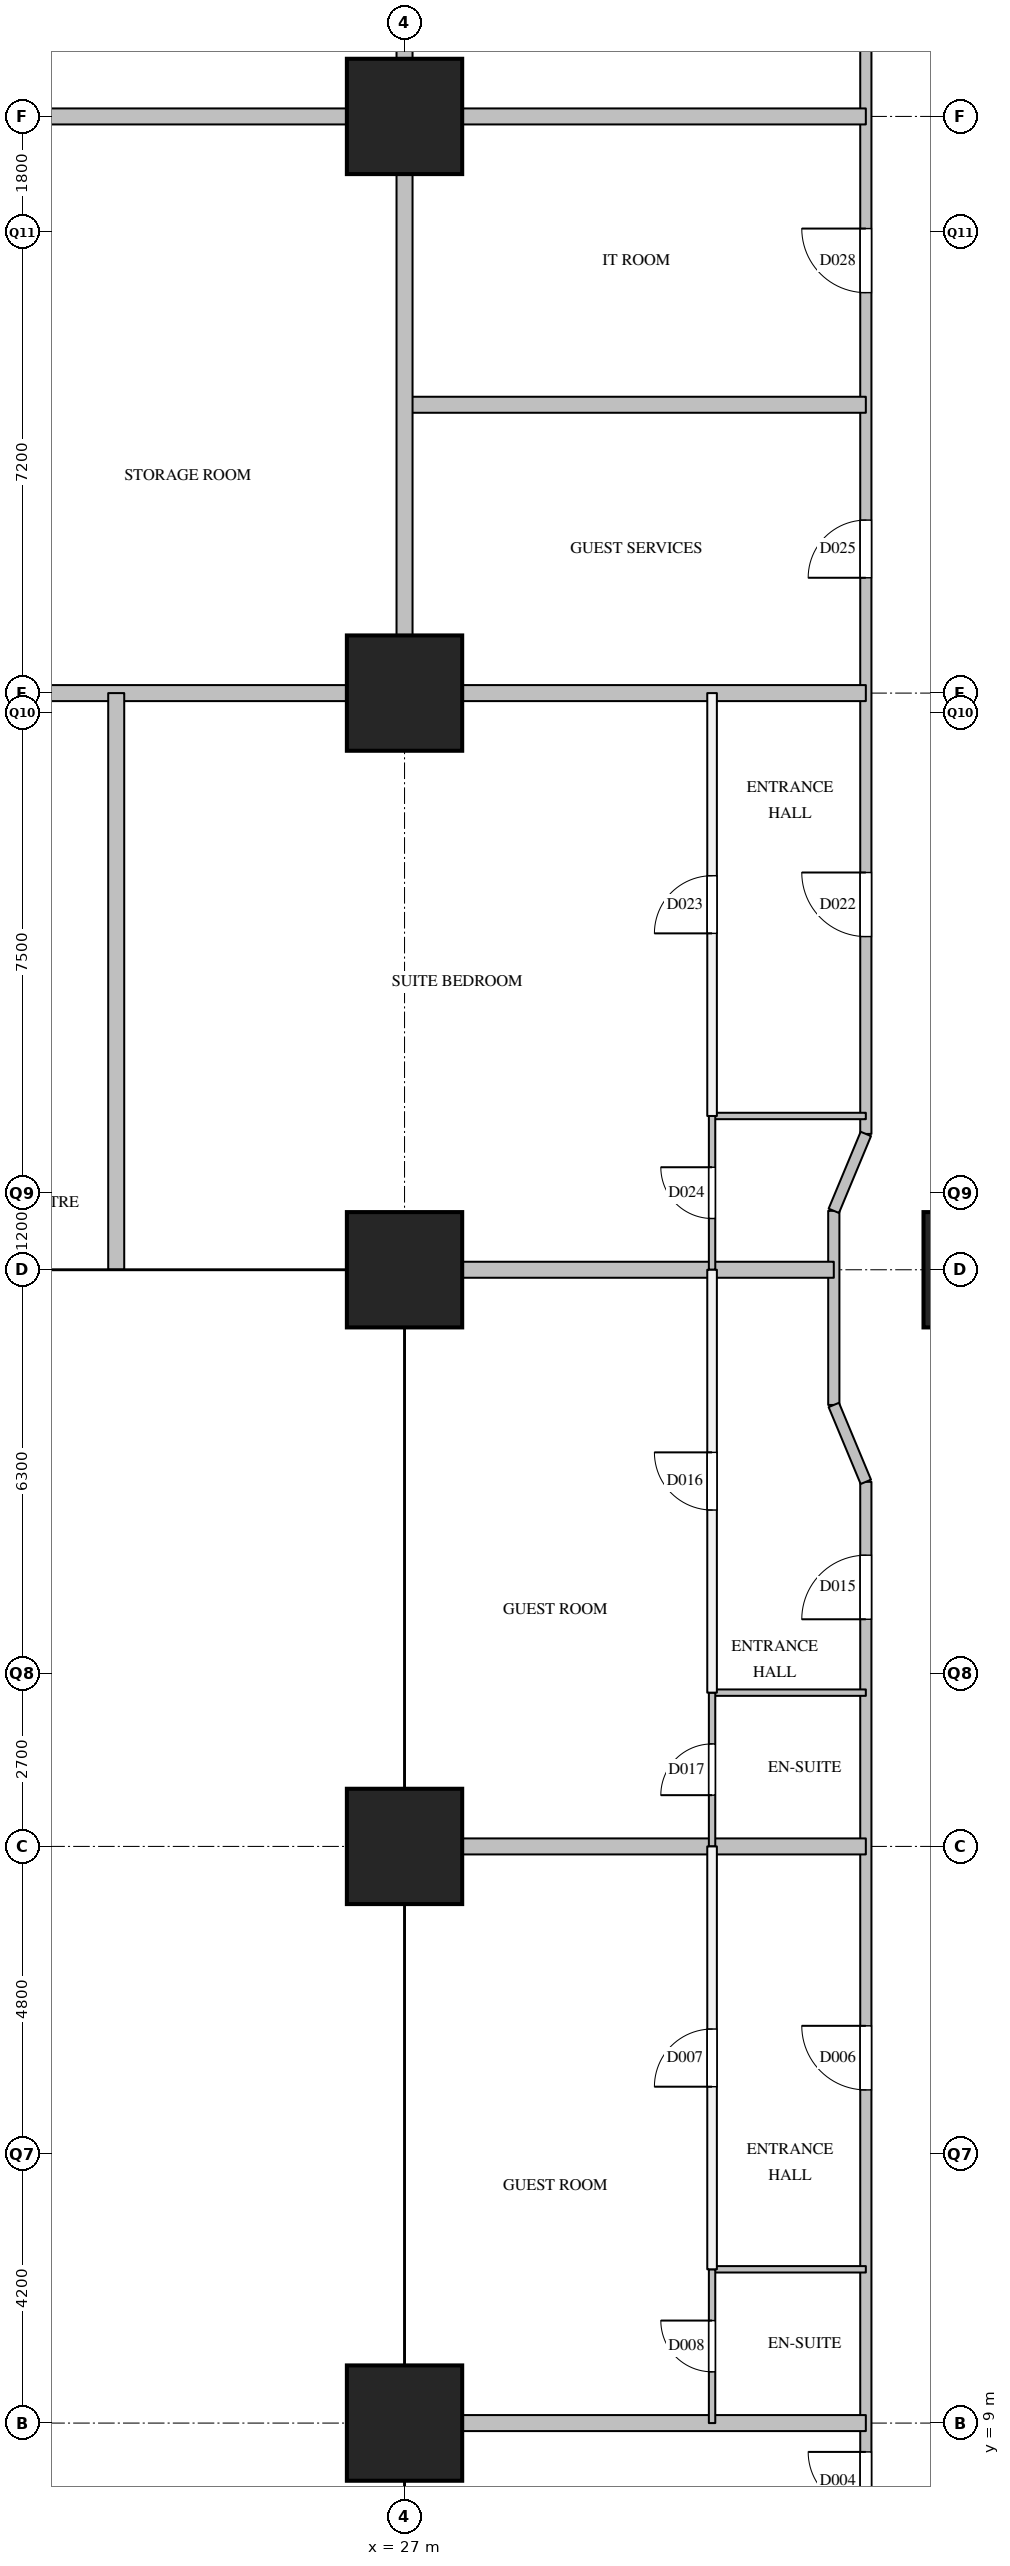
"""IFC4 building model, lengths in metres.
Left out: names, types, materials, properties, quantities, classifications, styles, units other than length and angle.
Written with IfcOpenShell. Run it as: python <this file> out.ifc"""

import sys

from ifc_helpers import new_model, si_unit, direction, frame, frame_2d, origin, origin_2d, place, context, subcontext, project, spatial, rectangle, extrude, element, fill, save


model = new_model("IFC4")
c1 = context("Model", 3, precision=1e-05, world=origin(), true_north=direction((0.0, 1.0)))
c2 = subcontext(c1, "Body", "Model", "MODEL_VIEW")
j1 = project(units=[si_unit("LENGTHUNIT", "METRE"), si_unit("PLANEANGLEUNIT", "RADIAN")], contexts=[c1])
p1 = place(None, origin())
s1 = spatial("IfcSite", under=j1, at=p1, CompositionType="ELEMENT")
p2 = place(p1, origin())
s2 = spatial("IfcBuilding", under=s1, at=p2, CompositionType="ELEMENT")
p3 = place(p2, frame((0.0, 0.0, 100.6)))
s3 = spatial("IfcBuildingStorey", under=s2, at=p3, CompositionType="ELEMENT", Elevation=100.6)
for number, where, z_axis, x_axis in (
    (1, (27.0, 9.0, 0.0), (0.0, 0.0, 1.0), (1.0, 0.0, 0.0)),
    (2, (27.0, 18.0, 0.0), (0.0, 0.0, 1.0), (1.0, 0.0, 0.0)),
    (3, (27.0, 27.0, 0.0), (0.0, 0.0, 1.0), (1.0, 0.0, 0.0)),
    (4, (27.0, 36.0, 0.0), (0.0, 0.0, 1.0), (1.0, 0.0, 0.0)),
    (5, (27.0, 45.0, 0.0), (0.0, 0.0, 1.0), (1.0, 0.0, 0.0)),
    (6, (36.0, 27.0, 0.0), (0.0, 0.0, 1.0), (1.0, 0.0, 0.0)),
):
    element("IfcColumn", number, at=place(p3, frame(where, z_axis=z_axis, x_axis=x_axis)), inside=s3, PredefinedType="COLUMN", context=c2, shape_type="SweptSolid", body=[
        extrude(rectangle(XDim=1.8, YDim=1.8, at=origin_2d()), origin(), (0.0, 0.0, 1.0), 3.8),
    ])
p4 = place(p3, frame((33.7, 24.89, 0.0), z_axis=(0.0, 0.0, 1.0), x_axis=(0.0, 1.0, 0.0)))
e7 = element("IfcWall", 7, at=p4, inside=s3, PredefinedType="PARTITIONING", context=c2, shape_type="SweptSolid", body=[
    extrude(rectangle(XDim=3.03, YDim=0.175, at=frame_2d((1.515, 0.0))), origin(), (0.0, 0.0, 1.0), 2.5),
])
p5 = place(p3, frame((34.2, 7.2, 0.0), z_axis=(0.0, 0.0, 1.0), x_axis=(0.0, 1.0, 0.0)))
e8 = element("IfcWall", 8, at=p5, inside=s3, PredefinedType="PARTITIONING", context=c2, shape_type="SweptSolid", body=[
    extrude(rectangle(XDim=16.49, YDim=0.175, at=frame_2d((8.245, 0.0))), origin(), (0.0, 0.0, 1.0), 3.5),
])
p6 = place(p5, frame((0.45, 0.0, 0.0)))
e9 = element("IfcOpeningElement", 9, at=p6, cuts=e8, PredefinedType="OPENING", context=c2, shape_type="SweptSolid", body=[
    extrude(rectangle(XDim=0.9, YDim=2.1, at=frame_2d((0.45, 1.05))), frame((0.0, 0.097, 0.0), z_axis=(0.0, -1.0, 0.0), x_axis=(1.0, 0.0, 0.0)), (0.0, 0.0, 1.0), 0.195),
])
p7 = place(p5, frame((7.0, 0.0, 0.0)))
e10 = element("IfcOpeningElement", 10, at=p7, cuts=e8, PredefinedType="OPENING", context=c2, shape_type="SweptSolid", body=[
    extrude(rectangle(XDim=1.0, YDim=2.1, at=frame_2d((0.5, 1.05))), frame((0.0, 0.097, 0.0), z_axis=(0.0, -1.0, 0.0), x_axis=(1.0, 0.0, 0.0)), (0.0, 0.0, 1.0), 0.195),
])
p8 = place(p5, frame((14.345, 0.0, 0.0)))
e11 = element("IfcOpeningElement", 11, at=p8, cuts=e8, PredefinedType="OPENING", context=c2, shape_type="SweptSolid", body=[
    extrude(rectangle(XDim=1.0, YDim=2.1, at=frame_2d((0.5, 1.05))), frame((0.0, 0.097, 0.0), z_axis=(0.0, -1.0, 0.0), x_axis=(1.0, 0.0, 0.0)), (0.0, 0.0, 1.0), 0.195),
])
p9 = place(p3, frame((34.2, 29.12, 0.0), z_axis=(0.0, 0.0, 1.0), x_axis=(0.0, 1.0, 0.0)))
e12 = element("IfcWall", 12, at=p9, inside=s3, PredefinedType="PARTITIONING", context=c2, shape_type="SweptSolid", body=[
    extrude(rectangle(XDim=22.68, YDim=0.175, at=frame_2d((11.34, 0.0))), origin(), (0.0, 0.0, 1.0), 3.5),
])
p10 = place(p9, frame((3.08, 0.0, 0.0)))
e13 = element("IfcOpeningElement", 13, at=p10, cuts=e12, PredefinedType="OPENING", context=c2, shape_type="SweptSolid", body=[
    extrude(rectangle(XDim=1.0, YDim=2.1, at=frame_2d((0.5, 1.05))), frame((0.0, 0.097, 0.0), z_axis=(0.0, -1.0, 0.0), x_axis=(1.0, 0.0, 0.0)), (0.0, 0.0, 1.0), 0.195),
])
p11 = place(p9, frame((8.68, 0.0, 0.0)))
e14 = element("IfcOpeningElement", 14, at=p11, cuts=e12, PredefinedType="OPENING", context=c2, shape_type="SweptSolid", body=[
    extrude(rectangle(XDim=0.9, YDim=2.1, at=frame_2d((0.45, 1.05))), frame((0.0, 0.097, 0.0), z_axis=(0.0, -1.0, 0.0), x_axis=(1.0, 0.0, 0.0)), (0.0, 0.0, 1.0), 0.195),
])
p12 = place(p9, frame((13.13, 0.0, 0.0)))
e15 = element("IfcOpeningElement", 15, at=p12, cuts=e12, PredefinedType="OPENING", context=c2, shape_type="SweptSolid", body=[
    extrude(rectangle(XDim=1.0, YDim=2.1, at=frame_2d((0.5, 1.05))), frame((0.0, 0.097, 0.0), z_axis=(0.0, -1.0, 0.0), x_axis=(1.0, 0.0, 0.0)), (0.0, 0.0, 1.0), 0.195),
])
p13 = place(p9, frame((18.83, 0.0, 0.0)))
e16 = element("IfcOpeningElement", 16, at=p13, cuts=e12, PredefinedType="OPENING", context=c2, shape_type="SweptSolid", body=[
    extrude(rectangle(XDim=0.9, YDim=2.1, at=frame_2d((0.45, 1.05))), frame((0.0, 0.097, 0.0), z_axis=(0.0, -1.0, 0.0), x_axis=(1.0, 0.0, 0.0)), (0.0, 0.0, 1.0), 0.195),
])
p14 = place(p3, frame((31.8, 11.4, 0.0), z_axis=(0.0, 0.0, 1.0), x_axis=(0.0, 1.0, 0.0)))
e17 = element("IfcWall", 17, at=p14, inside=s3, PredefinedType="PARTITIONING", context=c2, shape_type="SweptSolid", body=[
    extrude(rectangle(XDim=6.6, YDim=0.15, at=frame_2d((3.3, 0.0))), origin(), (0.0, 0.0, 1.0), 3.5),
])
p15 = place(p14, frame((2.85, 0.0, 0.0)))
e18 = element("IfcOpeningElement", 18, at=p15, cuts=e17, PredefinedType="OPENING", context=c2, shape_type="SweptSolid", body=[
    extrude(rectangle(XDim=0.9, YDim=2.1, at=frame_2d((0.45, 1.05))), frame((0.0, 0.085, 0.0), z_axis=(0.0, -1.0, 0.0), x_axis=(1.0, 0.0, 0.0)), (0.0, 0.0, 1.0), 0.17),
])
p16 = place(p3, frame((31.8, 20.4, 0.0), z_axis=(0.0, 0.0, 1.0), x_axis=(0.0, 1.0, 0.0)))
e19 = element("IfcWall", 19, at=p16, inside=s3, PredefinedType="PARTITIONING", context=c2, shape_type="SweptSolid", body=[
    extrude(rectangle(XDim=6.6, YDim=0.15, at=frame_2d((3.3, 0.0))), origin(), (0.0, 0.0, 1.0), 2.5),
])
p17 = place(p16, frame((2.85, 0.0, 0.0)))
e20 = element("IfcOpeningElement", 20, at=p17, cuts=e19, PredefinedType="OPENING", context=c2, shape_type="SweptSolid", body=[
    extrude(rectangle(XDim=0.9, YDim=2.1, at=frame_2d((0.45, 1.05))), frame((0.0, 0.085, 0.0), z_axis=(0.0, -1.0, 0.0), x_axis=(1.0, 0.0, 0.0)), (0.0, 0.0, 1.0), 0.17),
])
p18 = place(p3, frame((31.8, 29.4, 0.0), z_axis=(0.0, 0.0, 1.0), x_axis=(0.0, 1.0, 0.0)))
e21 = element("IfcWall", 21, at=p18, inside=s3, PredefinedType="PARTITIONING", context=c2, shape_type="SweptSolid", body=[
    extrude(rectangle(XDim=6.6, YDim=0.15, at=frame_2d((3.3, 0.0))), origin(), (0.0, 0.0, 1.0), 3.5),
])
p19 = place(p18, frame((2.85, 0.0, 0.0)))
e22 = element("IfcOpeningElement", 22, at=p19, cuts=e21, PredefinedType="OPENING", context=c2, shape_type="SweptSolid", body=[
    extrude(rectangle(XDim=0.9, YDim=2.1, at=frame_2d((0.45, 1.05))), frame((0.0, 0.085, 0.0), z_axis=(0.0, -1.0, 0.0), x_axis=(1.0, 0.0, 0.0)), (0.0, 0.0, 1.0), 0.17),
])
for number, where, z_axis, x_axis in (
    (23, (27.0, 9.0, 0.0), (0.0, 0.0, 1.0), (1.0, 0.0, 0.0)),
    (24, (27.0, 18.0, 0.0), (0.0, 0.0, 1.0), (1.0, 0.0, 0.0)),
):
    element("IfcWall", number, at=place(p3, frame(where, z_axis=z_axis, x_axis=x_axis)), inside=s3, PredefinedType="PARTITIONING", context=c2, shape_type="SweptSolid", body=[
        extrude(rectangle(XDim=7.2, YDim=0.25, at=frame_2d((3.6, 0.0))), origin(), (0.0, 0.0, 1.0), 3.5),
    ])
p20 = place(p3, frame((27.0, 27.0, 0.0), z_axis=(0.0, 0.0, 1.0), x_axis=(1.0, 0.0, 0.0)))
e25 = element("IfcWall", 25, at=p20, inside=s3, PredefinedType="PARTITIONING", context=c2, shape_type="SweptSolid", body=[
    extrude(rectangle(XDim=6.7, YDim=0.25, at=frame_2d((3.35, 0.0))), origin(), (0.0, 0.0, 1.0), 2.5),
])
p21 = place(p3, frame((19.8, 36.0, 0.0), z_axis=(0.0, 0.0, 1.0), x_axis=(1.0, 0.0, 0.0)))
e26 = element("IfcWall", 26, at=p21, inside=s3, PredefinedType="PARTITIONING", context=c2, shape_type="SweptSolid", body=[
    extrude(rectangle(XDim=14.4, YDim=0.25, at=frame_2d((7.2, 0.0))), origin(), (0.0, 0.0, 1.0), 3.5),
])
p22 = place(p3, frame((27.0, 40.5, 0.0), z_axis=(0.0, 0.0, 1.0), x_axis=(1.0, 0.0, 0.0)))
e27 = element("IfcWall", 27, at=p22, inside=s3, PredefinedType="PARTITIONING", context=c2, shape_type="SweptSolid", body=[
    extrude(rectangle(XDim=7.2, YDim=0.25, at=frame_2d((3.6, 0.0))), origin(), (0.0, 0.0, 1.0), 2.5),
])
p23 = place(p3, frame((19.8, 45.0, 0.0), z_axis=(0.0, 0.0, 1.0), x_axis=(1.0, 0.0, 0.0)))
e28 = element("IfcWall", 28, at=p23, inside=s3, PredefinedType="PARTITIONING", context=c2, shape_type="SweptSolid", body=[
    extrude(rectangle(XDim=14.4, YDim=0.25, at=frame_2d((7.2, 0.0))), origin(), (0.0, 0.0, 1.0), 3.5),
])
p24 = place(p3, frame((22.5, 27.0, 0.0), z_axis=(0.0, 0.0, 1.0), x_axis=(0.0, 1.0, 0.0)))
e29 = element("IfcWall", 29, at=p24, inside=s3, PredefinedType="PARTITIONING", context=c2, shape_type="SweptSolid", body=[
    extrude(rectangle(XDim=9.0, YDim=0.25, at=frame_2d((4.5, 0.0))), origin(), (0.0, 0.0, 1.0), 2.5),
])
p25 = place(p3, frame((27.0, 36.0, 0.0), z_axis=(0.0, 0.0, 1.0), x_axis=(0.0, 1.0, 0.0)))
e30 = element("IfcWall", 30, at=p25, inside=s3, PredefinedType="PARTITIONING", context=c2, shape_type="SweptSolid", body=[
    extrude(rectangle(XDim=18.0, YDim=0.25, at=frame_2d((9.0, 0.0))), origin(), (0.0, 0.0, 1.0), 2.5),
])
for number, where, z_axis, x_axis in (
    (31, (31.8, 11.4, 0.0), (0.0, 0.0, 1.0), (1.0, 0.0, 0.0)),
    (32, (31.8, 20.4, 0.0), (0.0, 0.0, 1.0), (1.0, 0.0, 0.0)),
    (33, (31.8, 29.4, 0.0), (0.0, 0.0, 1.0), (1.0, 0.0, 0.0)),
):
    element("IfcWall", number, at=place(p3, frame(where, z_axis=z_axis, x_axis=x_axis)), inside=s3, PredefinedType="PARTITIONING", context=c2, shape_type="SweptSolid", body=[
        extrude(rectangle(XDim=2.4, YDim=0.1, at=frame_2d((1.2, 0.0))), origin(), (0.0, 0.0, 1.0), 3.5),
    ])
p26 = place(p3, frame((31.8, 9.0, 0.0), z_axis=(0.0, 0.0, 1.0), x_axis=(0.0, 1.0, 0.0)))
e34 = element("IfcWall", 34, at=p26, inside=s3, PredefinedType="PARTITIONING", context=c2, shape_type="SweptSolid", body=[
    extrude(rectangle(XDim=2.4, YDim=0.1, at=frame_2d((1.2, 0.0))), origin(), (0.0, 0.0, 1.0), 3.5),
])
p27 = place(p26, frame((0.8, 0.0, 0.0)))
e35 = element("IfcOpeningElement", 35, at=p27, cuts=e34, PredefinedType="OPENING", context=c2, shape_type="SweptSolid", body=[
    extrude(rectangle(XDim=0.8, YDim=2.1, at=frame_2d((0.4, 1.05))), frame((0.0, 0.06, 0.0), z_axis=(0.0, -1.0, 0.0), x_axis=(1.0, 0.0, 0.0)), (0.0, 0.0, 1.0), 0.12),
])
p28 = place(p3, frame((31.8, 18.0, 0.0), z_axis=(0.0, 0.0, 1.0), x_axis=(0.0, 1.0, 0.0)))
e36 = element("IfcWall", 36, at=p28, inside=s3, PredefinedType="PARTITIONING", context=c2, shape_type="SweptSolid", body=[
    extrude(rectangle(XDim=2.4, YDim=0.1, at=frame_2d((1.2, 0.0))), origin(), (0.0, 0.0, 1.0), 3.5),
])
p29 = place(p28, frame((0.8, 0.0, 0.0)))
e37 = element("IfcOpeningElement", 37, at=p29, cuts=e36, PredefinedType="OPENING", context=c2, shape_type="SweptSolid", body=[
    extrude(rectangle(XDim=0.8, YDim=2.1, at=frame_2d((0.4, 1.05))), frame((0.0, 0.06, 0.0), z_axis=(0.0, -1.0, 0.0), x_axis=(1.0, 0.0, 0.0)), (0.0, 0.0, 1.0), 0.12),
])
p30 = place(p3, frame((31.8, 27.0, 0.0), z_axis=(0.0, 0.0, 1.0), x_axis=(0.0, 1.0, 0.0)))
e38 = element("IfcWall", 38, at=p30, inside=s3, PredefinedType="PARTITIONING", context=c2, shape_type="SweptSolid", body=[
    extrude(rectangle(XDim=2.4, YDim=0.1, at=frame_2d((1.2, 0.0))), origin(), (0.0, 0.0, 1.0), 2.5),
])
p31 = place(p30, frame((0.8, 0.0, 0.0)))
e39 = element("IfcOpeningElement", 39, at=p31, cuts=e38, PredefinedType="OPENING", context=c2, shape_type="SweptSolid", body=[
    extrude(rectangle(XDim=0.8, YDim=2.1, at=frame_2d((0.4, 1.05))), frame((0.0, 0.06, 0.0), z_axis=(0.0, -1.0, 0.0), x_axis=(1.0, 0.0, 0.0)), (0.0, 0.0, 1.0), 0.12),
])
p32 = place(p3, frame((34.2, 23.69, 0.0), z_axis=(0.0, 0.0, 1.0), x_axis=(-0.384628719983, 0.923071366561, 0.0)))
e40 = element("IfcWall", 40, at=p32, inside=s3, PredefinedType="PARTITIONING", context=c2, shape_type="SweptSolid", body=[
    extrude(rectangle(XDim=1.3, YDim=0.175, at=frame_2d((0.65, 0.0))), origin(), (0.0, 0.0, 1.0), 3.5),
])
p33 = place(p3, frame((33.7, 27.92, 0.0), z_axis=(0.0, 0.0, 1.0), x_axis=(0.384562051588, 0.923099143363, 0.0)))
e41 = element("IfcWall", 41, at=p33, inside=s3, PredefinedType="PARTITIONING", context=c2, shape_type="SweptSolid", body=[
    extrude(rectangle(XDim=1.3, YDim=0.175, at=frame_2d((0.65, 0.0))), origin(), (0.0, 0.0, 1.0), 3.5),
])
p34 = place(p6, origin())
e42 = element("IfcDoor", 42, at=p34, inside=s3, OperationType="SINGLE_SWING_RIGHT", PredefinedType="DOOR", context=c2, shape_type="SweptSolid", body=[
    extrude(rectangle(XDim=0.9, YDim=2.1, at=frame_2d((0.45, 1.05))), frame((0.0, 0.025, 0.0), z_axis=(0.0, -1.0, 0.0), x_axis=(1.0, 0.0, 0.0)), (0.0, 0.0, 1.0), 0.05),
])
fill(e9, e42)
p35 = place(p7, origin())
e43 = element("IfcDoor", 43, at=p35, inside=s3, OperationType="SINGLE_SWING_RIGHT", PredefinedType="DOOR", context=c2, shape_type="SweptSolid", body=[
    extrude(rectangle(XDim=1.0, YDim=2.1, at=frame_2d((0.5, 1.05))), frame((0.0, 0.025, 0.0), z_axis=(0.0, -1.0, 0.0), x_axis=(1.0, 0.0, 0.0)), (0.0, 0.0, 1.0), 0.05),
])
fill(e10, e43)
p36 = place(p15, origin())
e44 = element("IfcDoor", 44, at=p36, inside=s3, OperationType="SINGLE_SWING_LEFT", PredefinedType="DOOR", context=c2, shape_type="SweptSolid", body=[
    extrude(rectangle(XDim=0.9, YDim=2.1, at=frame_2d((0.45, 1.05))), frame((0.0, 0.025, 0.0), z_axis=(0.0, -1.0, 0.0), x_axis=(1.0, 0.0, 0.0)), (0.0, 0.0, 1.0), 0.05),
])
fill(e18, e44)
p37 = place(p27, origin())
e45 = element("IfcDoor", 45, at=p37, inside=s3, OperationType="SINGLE_SWING_RIGHT", PredefinedType="DOOR", context=c2, shape_type="SweptSolid", body=[
    extrude(rectangle(XDim=0.8, YDim=2.1, at=frame_2d((0.4, 1.05))), frame((0.0, 0.025, 0.0), z_axis=(0.0, -1.0, 0.0), x_axis=(1.0, 0.0, 0.0)), (0.0, 0.0, 1.0), 0.05),
])
fill(e35, e45)
p38 = place(p8, origin())
e46 = element("IfcDoor", 46, at=p38, inside=s3, OperationType="SINGLE_SWING_LEFT", PredefinedType="DOOR", context=c2, shape_type="SweptSolid", body=[
    extrude(rectangle(XDim=1.0, YDim=2.1, at=frame_2d((0.5, 1.05))), frame((0.0, 0.025, 0.0), z_axis=(0.0, -1.0, 0.0), x_axis=(1.0, 0.0, 0.0)), (0.0, 0.0, 1.0), 0.05),
])
fill(e11, e46)
p39 = place(p17, origin())
e47 = element("IfcDoor", 47, at=p39, inside=s3, OperationType="SINGLE_SWING_RIGHT", PredefinedType="DOOR", context=c2, shape_type="SweptSolid", body=[
    extrude(rectangle(XDim=0.9, YDim=2.1, at=frame_2d((0.45, 1.05))), frame((0.0, 0.025, 0.0), z_axis=(0.0, -1.0, 0.0), x_axis=(1.0, 0.0, 0.0)), (0.0, 0.0, 1.0), 0.05),
])
fill(e20, e47)
p40 = place(p29, origin())
e48 = element("IfcDoor", 48, at=p40, inside=s3, OperationType="SINGLE_SWING_LEFT", PredefinedType="DOOR", context=c2, shape_type="SweptSolid", body=[
    extrude(rectangle(XDim=0.8, YDim=2.1, at=frame_2d((0.4, 1.05))), frame((0.0, 0.025, 0.0), z_axis=(0.0, -1.0, 0.0), x_axis=(1.0, 0.0, 0.0)), (0.0, 0.0, 1.0), 0.05),
])
fill(e37, e48)
p41 = place(p10, origin())
e49 = element("IfcDoor", 49, at=p41, inside=s3, OperationType="SINGLE_SWING_RIGHT", PredefinedType="DOOR", context=c2, shape_type="SweptSolid", body=[
    extrude(rectangle(XDim=1.0, YDim=2.1, at=frame_2d((0.5, 1.05))), frame((0.0, 0.025, 0.0), z_axis=(0.0, -1.0, 0.0), x_axis=(1.0, 0.0, 0.0)), (0.0, 0.0, 1.0), 0.05),
])
fill(e13, e49)
p42 = place(p19, origin())
e50 = element("IfcDoor", 50, at=p42, inside=s3, OperationType="SINGLE_SWING_LEFT", PredefinedType="DOOR", context=c2, shape_type="SweptSolid", body=[
    extrude(rectangle(XDim=0.9, YDim=2.1, at=frame_2d((0.45, 1.05))), frame((0.0, 0.025, 0.0), z_axis=(0.0, -1.0, 0.0), x_axis=(1.0, 0.0, 0.0)), (0.0, 0.0, 1.0), 0.05),
])
fill(e22, e50)
p43 = place(p31, origin())
e51 = element("IfcDoor", 51, at=p43, inside=s3, OperationType="SINGLE_SWING_RIGHT", PredefinedType="DOOR", context=c2, shape_type="SweptSolid", body=[
    extrude(rectangle(XDim=0.8, YDim=2.1, at=frame_2d((0.4, 1.05))), frame((0.0, 0.025, 0.0), z_axis=(0.0, -1.0, 0.0), x_axis=(1.0, 0.0, 0.0)), (0.0, 0.0, 1.0), 0.05),
])
fill(e39, e51)
p44 = place(p11, origin())
e52 = element("IfcDoor", 52, at=p44, inside=s3, OperationType="SINGLE_SWING_LEFT", PredefinedType="DOOR", context=c2, shape_type="SweptSolid", body=[
    extrude(rectangle(XDim=0.9, YDim=2.1, at=frame_2d((0.45, 1.05))), frame((0.0, 0.025, 0.0), z_axis=(0.0, -1.0, 0.0), x_axis=(1.0, 0.0, 0.0)), (0.0, 0.0, 1.0), 0.05),
])
fill(e14, e52)
p45 = place(p12, origin())
e53 = element("IfcDoor", 53, at=p45, inside=s3, OperationType="SINGLE_SWING_RIGHT", PredefinedType="DOOR", context=c2, shape_type="SweptSolid", body=[
    extrude(rectangle(XDim=1.0, YDim=2.1, at=frame_2d((0.5, 1.05))), frame((0.0, 0.025, 0.0), z_axis=(0.0, -1.0, 0.0), x_axis=(1.0, 0.0, 0.0)), (0.0, 0.0, 1.0), 0.05),
])
fill(e15, e53)
save(model, sys.argv[1])
